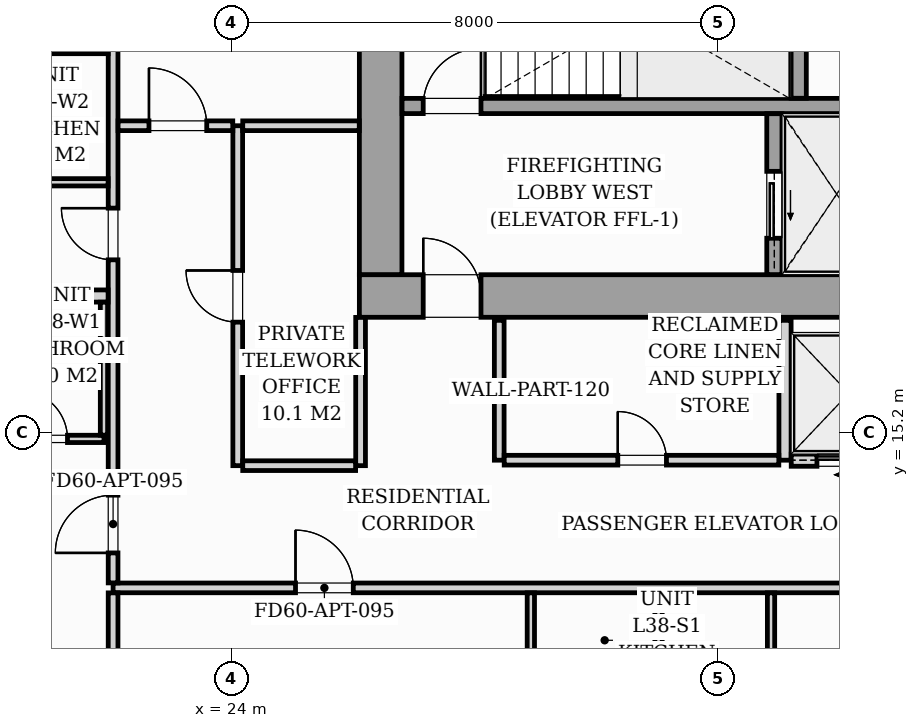
"""IFC4 building model, lengths in metres.
Left out: names, types, materials, properties, quantities, classifications, styles, units other than length and angle.
Written with IfcOpenShell. Run it as: python <this file> out.ifc"""

import sys

from ifc_helpers import new_model, si_unit, direction, frame, frame_2d, origin, origin_2d, place, context, subcontext, project, spatial, rectangle, i_section, extrude, source, transform, mapped, element, fill, save


model = new_model("IFC4")
c1 = context("Model", 3, precision=1e-05, world=origin(), true_north=direction((0.0, 1.0)))
c2 = subcontext(c1, "Body", "Model", "MODEL_VIEW")
j1 = project(units=[si_unit("LENGTHUNIT", "METRE"), si_unit("PLANEANGLEUNIT", "RADIAN")], contexts=[c1])
p1 = place(None, origin())
s1 = spatial("IfcSite", under=j1, at=p1, CompositionType="ELEMENT")
p2 = place(p1, origin())
s2 = spatial("IfcBuilding", under=s1, at=p2, CompositionType="ELEMENT")
p3 = place(p2, frame((0.0, 0.0, 134.2)))
s3 = spatial("IfcBuildingStorey", under=s2, at=p3, CompositionType="ELEMENT", Elevation=134.2)
m1 = source(origin(), c2, "Body", "SweptSolid", [
    extrude(i_section(OverallWidth=0.421, OverallDepth=0.465, WebThickness=0.045, FlangeThickness=0.073, FilletRadius=0.018, at=origin_2d()), origin(), (0.0, 0.0, 1.0), 3.196),
])
for number, where, z_axis, x_axis in (
    (1, (26.4, 17.4, 0.002), (0.0, 0.0, 1.0), (1.0, 0.0, 0.0)),
    (2, (33.12, 17.4, 0.002), (0.0, 0.0, 1.0), (1.0, 0.0, 0.0)),
):
    element("IfcColumn", number, at=place(p3, frame(where, z_axis=z_axis, x_axis=x_axis)), inside=s3, PredefinedType="PILASTER", context=c2, shape_type="MappedRepresentation", body=[
        mapped(m1, transform((0.0, 0.0, 0.0), scale=1.0)),
    ])
p4 = place(p3, frame((26.1, 17.45, 0.0), z_axis=(0.0, 0.0, 1.0), x_axis=(1.0, 0.0, 0.0)))
e3 = element("IfcWall", 3, at=p4, inside=s3, PredefinedType="SHEAR", context=c2, shape_type="SweptSolid", body=[
    extrude(rectangle(XDim=19.8, YDim=0.7, at=frame_2d((9.9, 0.0))), origin(), (0.0, 0.0, 1.0), 3.2),
])
p5 = place(p4, frame((1.05, 0.0, 0.0)))
e4 = element("IfcOpeningElement", 4, at=p5, cuts=e3, PredefinedType="OPENING", context=c2, shape_type="SweptSolid", body=[
    extrude(rectangle(XDim=0.95, YDim=2.06, at=frame_2d((0.475, 1.03))), frame((0.0, 0.36, 0.0), z_axis=(0.0, -1.0, 0.0), x_axis=(1.0, 0.0, 0.0)), (0.0, 0.0, 1.0), 0.72),
])
p6 = place(p4, frame((9.48, 0.0, 0.0)))
e5 = element("IfcOpeningElement", 5, at=p6, cuts=e3, PredefinedType="OPENING", context=c2, shape_type="SweptSolid", body=[
    extrude(rectangle(XDim=0.85, YDim=2.0, at=frame_2d((0.425, 1.0))), frame((0.0, 0.36, 0.0), z_axis=(0.0, -1.0, 0.0), x_axis=(1.0, 0.0, 0.0)), (0.0, 0.0, 1.0), 0.72),
])
p7 = place(p4, frame((17.65, 0.0, 0.0)))
e6 = element("IfcOpeningElement", 6, at=p7, cuts=e3, PredefinedType="OPENING", context=c2, shape_type="SweptSolid", body=[
    extrude(rectangle(XDim=0.95, YDim=2.06, at=frame_2d((0.475, 1.03))), frame((0.0, 0.36, 0.0), z_axis=(0.0, -1.0, 0.0), x_axis=(1.0, 0.0, 0.0)), (0.0, 0.0, 1.0), 0.72),
])
p8 = place(p3, frame((26.45, 17.802, 0.0), z_axis=(0.0, 0.0, 1.0), x_axis=(0.0, 1.0, 0.0)))
e7 = element("IfcWall", 7, at=p8, inside=s3, PredefinedType="SHEAR", context=c2, shape_type="SweptSolid", body=[
    extrude(rectangle(XDim=5.796, YDim=0.7, at=frame_2d((2.898, 0.0))), origin(), (0.0, 0.0, 1.0), 3.2),
])
p9 = place(p3, frame((26.802, 20.575, 0.0), z_axis=(0.0, 0.0, 1.0), x_axis=(1.0, 0.0, 0.0)))
e8 = element("IfcWall", 8, at=p9, inside=s3, PredefinedType="SOLIDWALL", context=c2, shape_type="SweptSolid", body=[
    extrude(rectangle(XDim=8.148, YDim=0.25, at=frame_2d((4.074, 0.0))), origin(), (0.0, 0.0, 1.0), 3.2),
])
p10 = place(p9, frame((0.348, 0.0, 0.0)))
e9 = element("IfcOpeningElement", 9, at=p10, cuts=e8, PredefinedType="OPENING", context=c2, shape_type="SweptSolid", body=[
    extrude(rectangle(XDim=0.95, YDim=2.06, at=frame_2d((0.475, 1.03))), frame((0.0, 0.135, 0.0), z_axis=(0.0, -1.0, 0.0), x_axis=(1.0, 0.0, 0.0)), (0.0, 0.0, 1.0), 0.27),
])
p11 = place(p3, frame((33.325, 20.702, 0.0), z_axis=(0.0, 0.0, 1.0), x_axis=(0.0, 1.0, 0.0)))
e10 = element("IfcWall", 10, at=p11, inside=s3, PredefinedType="SOLIDWALL", context=c2, shape_type="SweptSolid", body=[
    extrude(rectangle(XDim=2.896, YDim=0.25, at=frame_2d((1.448, 0.0))), origin(), (0.0, 0.0, 1.0), 3.2),
])
p12 = place(p3, frame((32.925, 17.802, 0.0), z_axis=(0.0, 0.0, 1.0), x_axis=(0.0, 1.0, 0.0)))
e11 = element("IfcWall", 11, at=p12, inside=s3, PredefinedType="SOLIDWALL", context=c2, shape_type="SweptSolid", body=[
    extrude(rectangle(XDim=2.646, YDim=0.25, at=frame_2d((1.323, 0.0))), origin(), (0.0, 0.0, 1.0), 3.2),
])
p13 = place(p12, frame((0.598, 0.0, 0.0)))
e12 = element("IfcOpeningElement", 12, at=p13, cuts=e11, PredefinedType="OPENING", context=c2, shape_type="SweptSolid", body=[
    extrude(rectangle(XDim=1.1, YDim=2.08, at=frame_2d((0.55, 1.04))), frame((0.0, 0.135, 0.0), z_axis=(0.0, -1.0, 0.0), x_axis=(1.0, 0.0, 0.0)), (0.0, 0.0, 1.0), 0.27),
])
p14 = place(p3, frame((28.4, 14.75, 0.0), z_axis=(0.0, 0.0, 1.0), x_axis=(0.0, 1.0, 0.0)))
e13 = element("IfcWall", 13, at=p14, inside=s3, PredefinedType="PARTITIONING", context=c2, shape_type="SweptSolid", body=[
    extrude(rectangle(XDim=2.3, YDim=0.16, at=frame_2d((1.15, 0.0))), origin(), (0.0, 0.0, 1.0), 2.94),
])
p15 = place(p3, frame((33.1, 14.75, 0.0), z_axis=(0.0, 0.0, 1.0), x_axis=(0.0, 1.0, 0.0)))
e14 = element("IfcWall", 14, at=p15, inside=s3, PredefinedType="PARTITIONING", context=c2, shape_type="SweptSolid", body=[
    extrude(rectangle(XDim=2.3, YDim=0.2, at=frame_2d((1.15, 0.0))), origin(), (0.0, 0.0, 1.0), 2.94),
])
p16 = place(p3, frame((28.482, 14.75, 0.0), z_axis=(0.0, 0.0, 1.0), x_axis=(1.0, 0.0, 0.0)))
e15 = element("IfcWall", 15, at=p16, inside=s3, PredefinedType="PARTITIONING", context=c2, shape_type="SweptSolid", body=[
    extrude(rectangle(XDim=4.516, YDim=0.16, at=frame_2d((2.258, 0.0))), origin(), (0.0, 0.0, 1.0), 2.94),
])
p17 = place(p16, frame((1.868, 0.0, 0.0)))
e16 = element("IfcOpeningElement", 16, at=p17, cuts=e15, PredefinedType="OPENING", context=c2, shape_type="SweptSolid", body=[
    extrude(rectangle(XDim=0.8, YDim=2.05, at=frame_2d((0.4, 1.025))), frame((0.0, 0.09, 0.0), z_axis=(0.0, -1.0, 0.0), x_axis=(1.0, 0.0, 0.0)), (0.0, 0.0, 1.0), 0.18),
])
p18 = place(p3, frame((33.202, 14.75, 0.0), z_axis=(0.0, 0.0, 1.0), x_axis=(1.0, 0.0, 0.0)))
e17 = element("IfcWall", 17, at=p18, inside=s3, PredefinedType="PARTITIONING", context=c2, shape_type="SweptSolid", body=[
    extrude(rectangle(XDim=1.896, YDim=0.2, at=frame_2d((0.948, 0.0))), origin(), (0.0, 0.0, 1.0), 2.94),
])
p19 = place(p18, frame((0.423, 0.0, 0.0)))
e18 = element("IfcOpeningElement", 18, at=p19, cuts=e17, PredefinedType="OPENING", context=c2, shape_type="SweptSolid", body=[
    extrude(rectangle(XDim=1.05, YDim=2.08, at=frame_2d((0.525, 1.04))), frame((0.0, 0.11, 0.0), z_axis=(0.0, -1.0, 0.0), x_axis=(1.0, 0.0, 0.0)), (0.0, 0.0, 1.0), 0.22),
])
p20 = place(p3, frame((22.05, 12.65, 0.0), z_axis=(0.0, 0.0, 1.0), x_axis=(1.0, 0.0, 0.0)))
e19 = element("IfcWall", 19, at=p20, inside=s3, PredefinedType="PARTITIONING", context=c2, shape_type="SweptSolid", body=[
    extrude(rectangle(XDim=23.83, YDim=0.16, at=frame_2d((11.915, 0.0))), origin(), (0.0, 0.0, 1.0), 2.94),
])
p21 = place(p20, frame((3.0, 0.0, 0.0)))
e20 = element("IfcOpeningElement", 20, at=p21, cuts=e19, PredefinedType="OPENING", context=c2, shape_type="SweptSolid", body=[
    extrude(rectangle(XDim=0.95, YDim=2.06, at=frame_2d((0.475, 1.03))), frame((0.0, 0.09, 0.0), z_axis=(0.0, -1.0, 0.0), x_axis=(1.0, 0.0, 0.0)), (0.0, 0.0, 1.0), 0.18),
])
p22 = place(p20, frame((15.485, 0.0, 0.0)))
e21 = element("IfcOpeningElement", 21, at=p22, cuts=e19, PredefinedType="OPENING", context=c2, shape_type="SweptSolid", body=[
    extrude(rectangle(XDim=0.95, YDim=2.06, at=frame_2d((0.475, 1.03))), frame((0.0, 0.09, 0.0), z_axis=(0.0, -1.0, 0.0), x_axis=(1.0, 0.0, 0.0)), (0.0, 0.0, 1.0), 0.18),
])
p23 = place(p3, frame((22.05, 8.253, 0.0), z_axis=(0.0, 0.0, 1.0), x_axis=(0.0, 1.0, 0.0)))
e22 = element("IfcWall", 22, at=p23, inside=s3, PredefinedType="PARTITIONING", context=c2, shape_type="SweptSolid", body=[
    extrude(rectangle(XDim=4.315, YDim=0.16, at=frame_2d((2.157, 0.0))), origin(), (0.0, 0.0, 1.0), 2.94),
])
p24 = place(p3, frame((22.05, 12.732, 0.0), z_axis=(0.0, 0.0, 1.0), x_axis=(0.0, 1.0, 0.0)))
e23 = element("IfcWall", 23, at=p24, inside=s3, PredefinedType="PARTITIONING", context=c2, shape_type="SweptSolid", body=[
    extrude(rectangle(XDim=14.685, YDim=0.16, at=frame_2d((7.343, 0.0))), origin(), (0.0, 0.0, 1.0), 2.94),
])
p25 = place(p24, frame((0.493, 0.0, 0.0)))
e24 = element("IfcOpeningElement", 24, at=p25, cuts=e23, PredefinedType="OPENING", context=c2, shape_type="SweptSolid", body=[
    extrude(rectangle(XDim=0.95, YDim=2.06, at=frame_2d((0.475, 1.03))), frame((0.0, 0.09, 0.0), z_axis=(0.0, -1.0, 0.0), x_axis=(1.0, 0.0, 0.0)), (0.0, 0.0, 1.0), 0.18),
])
p26 = place(p24, frame((5.313, 0.0, 0.0)))
e25 = element("IfcOpeningElement", 25, at=p26, cuts=e23, PredefinedType="OPENING", context=c2, shape_type="SweptSolid", body=[
    extrude(rectangle(XDim=0.85, YDim=2.0, at=frame_2d((0.425, 1.0))), frame((0.0, 0.09, 0.0), z_axis=(0.0, -1.0, 0.0), x_axis=(1.0, 0.0, 0.0)), (0.0, 0.0, 1.0), 0.18),
])
p27 = place(p3, frame((32.87, 7.028, 0.0), z_axis=(0.0, 0.0, 1.0), x_axis=(0.0, 1.0, 0.0)))
e26 = element("IfcWall", 26, at=p27, inside=s3, PredefinedType="PARTITIONING", context=c2, shape_type="SweptSolid", body=[
    extrude(rectangle(XDim=5.54, YDim=0.12, at=frame_2d((2.77, 0.0))), origin(), (0.0, 0.0, 1.0), 2.94),
])
p28 = place(p27, frame((2.272, 0.0, 0.0)))
e27 = element("IfcOpeningElement", 27, at=p28, cuts=e26, PredefinedType="OPENING", context=c2, shape_type="SweptSolid", body=[
    extrude(rectangle(XDim=0.9, YDim=2.05, at=frame_2d((0.45, 1.025))), frame((0.0, 0.07, 0.0), z_axis=(0.0, -1.0, 0.0), x_axis=(1.0, 0.0, 0.0)), (0.0, 0.0, 1.0), 0.14),
])
for number, where, z_axis, x_axis in (
    (28, (31.02, 10.462, 0.0), (0.0, 0.0, 1.0), (0.0, 1.0, 0.0)),
    (29, (28.92, 10.462, 0.0), (0.0, 0.0, 1.0), (0.0, 1.0, 0.0)),
):
    element("IfcWall", number, at=place(p3, frame(where, z_axis=z_axis, x_axis=x_axis)), inside=s3, PredefinedType="PARTITIONING", context=c2, shape_type="SweptSolid", body=[
        extrude(rectangle(XDim=2.106, YDim=0.12, at=frame_2d((1.053, 0.0))), origin(), (0.0, 0.0, 1.0), 2.94),
    ])
p29 = place(p3, frame((6.019, 17.45, 0.0), z_axis=(0.0, 0.0, 1.0), x_axis=(1.0, 0.0, 0.0)))
e30 = element("IfcWall", 30, at=p29, inside=s3, PredefinedType="PARTITIONING", context=c2, shape_type="SweptSolid", body=[
    extrude(rectangle(XDim=15.949, YDim=0.2, at=frame_2d((7.975, 0.0))), origin(), (0.0, 0.0, 1.0), 2.94),
])
p30 = place(p3, frame((17.7, 15.1, 0.0), z_axis=(0.0, 0.0, 1.0), x_axis=(1.0, 0.0, 0.0)))
e31 = element("IfcWall", 31, at=p30, inside=s3, PredefinedType="PARTITIONING", context=c2, shape_type="SweptSolid", body=[
    extrude(rectangle(XDim=4.2, YDim=0.12, at=frame_2d((2.1, 0.0))), origin(), (0.0, 0.0, 1.0), 2.94),
])
p31 = place(p30, frame((0.675, 0.0, 0.0)))
e32 = element("IfcOpeningElement", 32, at=p31, cuts=e31, PredefinedType="OPENING", context=c2, shape_type="SweptSolid", body=[
    extrude(rectangle(XDim=0.85, YDim=2.05, at=frame_2d((0.425, 1.025))), frame((0.0, 0.07, 0.0), z_axis=(0.0, -1.0, 0.0), x_axis=(1.0, 0.0, 0.0)), (0.0, 0.0, 1.0), 0.14),
])
p32 = place(p30, frame((2.8, 0.0, 0.0)))
e33 = element("IfcOpeningElement", 33, at=p32, cuts=e31, PredefinedType="OPENING", context=c2, shape_type="SweptSolid", body=[
    extrude(rectangle(XDim=0.8, YDim=2.02, at=frame_2d((0.4, 1.01))), frame((0.0, 0.07, 0.0), z_axis=(0.0, -1.0, 0.0), x_axis=(1.0, 0.0, 0.0)), (0.0, 0.0, 1.0), 0.14),
])
p33 = place(p3, frame((21.9, 15.162, 0.0), z_axis=(0.0, 0.0, 1.0), x_axis=(0.0, 1.0, 0.0)))
e34 = element("IfcWall", 34, at=p33, inside=s3, PredefinedType="PARTITIONING", context=c2, shape_type="SweptSolid", body=[
    extrude(rectangle(XDim=2.186, YDim=0.12, at=frame_2d((1.093, 0.0))), origin(), (0.0, 0.0, 1.0), 2.94),
])
for number, where, z_axis, x_axis in (
    (35, (19.712, 21.495, 0.0), (0.0, 0.0, 1.0), (1.0, 0.0, 0.0)),
    (36, (19.712, 19.32, 0.0), (0.0, 0.0, 1.0), (1.0, 0.0, 0.0)),
):
    element("IfcWall", number, at=place(p3, frame(where, z_axis=z_axis, x_axis=x_axis)), inside=s3, PredefinedType="PARTITIONING", context=c2, shape_type="SweptSolid", body=[
        extrude(rectangle(XDim=2.256, YDim=0.12, at=frame_2d((1.128, 0.0))), origin(), (0.0, 0.0, 1.0), 2.94),
    ])
p34 = place(p3, frame((24.1, 14.66, 0.0), z_axis=(0.0, 0.0, 1.0), x_axis=(0.0, 1.0, 0.0)))
e37 = element("IfcWall", 37, at=p34, inside=s3, PredefinedType="PARTITIONING", context=c2, shape_type="SweptSolid", body=[
    extrude(rectangle(XDim=5.59, YDim=0.16, at=frame_2d((2.795, 0.0))), origin(), (0.0, 0.0, 1.0), 2.94),
])
p35 = place(p34, frame((2.36, 0.0, 0.0)))
e38 = element("IfcOpeningElement", 38, at=p35, cuts=e37, PredefinedType="OPENING", context=c2, shape_type="SweptSolid", body=[
    extrude(rectangle(XDim=0.85, YDim=2.0, at=frame_2d((0.425, 1.0))), frame((0.0, 0.09, 0.0), z_axis=(0.0, -1.0, 0.0), x_axis=(1.0, 0.0, 0.0)), (0.0, 0.0, 1.0), 0.18),
])
p36 = place(p3, frame((22.132, 20.25, 0.0), z_axis=(0.0, 0.0, 1.0), x_axis=(1.0, 0.0, 0.0)))
e39 = element("IfcWall", 39, at=p36, inside=s3, PredefinedType="PARTITIONING", context=c2, shape_type="SweptSolid", body=[
    extrude(rectangle(XDim=1.886, YDim=0.16, at=frame_2d((0.943, 0.0))), origin(), (0.0, 0.0, 1.0), 2.94),
])
p37 = place(p36, frame((0.508, 0.0, 0.0)))
e40 = element("IfcOpeningElement", 40, at=p37, cuts=e39, PredefinedType="OPENING", context=c2, shape_type="SweptSolid", body=[
    extrude(rectangle(XDim=0.95, YDim=2.06, at=frame_2d((0.475, 1.03))), frame((0.0, 0.09, 0.0), z_axis=(0.0, -1.0, 0.0), x_axis=(1.0, 0.0, 0.0)), (0.0, 0.0, 1.0), 0.18),
])
p38 = place(p3, frame((24.182, 20.25, 0.0), z_axis=(0.0, 0.0, 1.0), x_axis=(1.0, 0.0, 0.0)))
e41 = element("IfcWall", 41, at=p38, inside=s3, PredefinedType="PARTITIONING", context=c2, shape_type="SweptSolid", body=[
    extrude(rectangle(XDim=1.916, YDim=0.16, at=frame_2d((0.958, 0.0))), origin(), (0.0, 0.0, 1.0), 2.94),
])
p39 = place(p3, frame((26.12, 14.66, 0.0), z_axis=(0.0, 0.0, 1.0), x_axis=(0.0, 1.0, 0.0)))
e42 = element("IfcWall", 42, at=p39, inside=s3, PredefinedType="PARTITIONING", context=c2, shape_type="SweptSolid", body=[
    extrude(rectangle(XDim=2.438, YDim=0.16, at=frame_2d((1.219, 0.0))), origin(), (0.0, 0.0, 1.0), 2.94),
])
p40 = place(p3, frame((24.182, 14.66, 0.0), z_axis=(0.0, 0.0, 1.0), x_axis=(1.0, 0.0, 0.0)))
e43 = element("IfcWall", 43, at=p40, inside=s3, PredefinedType="PARTITIONING", context=c2, shape_type="SweptSolid", body=[
    extrude(rectangle(XDim=1.856, YDim=0.16, at=frame_2d((0.928, 0.0))), origin(), (0.0, 0.0, 1.0), 2.94),
])
m2 = source(origin(), c2, "Body", "SweptSolid", [
    extrude(rectangle(XDim=0.95, YDim=2.06, at=frame_2d((0.475, 1.03))), frame((0.0, 0.025, 0.0), z_axis=(0.0, -1.0, 0.0), x_axis=(1.0, 0.0, 0.0)), (0.0, 0.0, 1.0), 0.05),
])
p41 = place(p5, origin())
e44 = element("IfcDoor", 44, at=p41, inside=s3, OperationType="SINGLE_SWING_LEFT", PredefinedType="DOOR", context=c2, shape_type="MappedRepresentation", body=[
    mapped(m2, transform((0.0, 0.0, 0.0), scale=1.0)),
])
fill(e4, e44)
p42 = place(p10, origin())
e45 = element("IfcDoor", 45, at=p42, inside=s3, OperationType="SINGLE_SWING_RIGHT", PredefinedType="DOOR", context=c2, shape_type="MappedRepresentation", body=[
    mapped(m2, transform((0.0, 0.0, 0.0), scale=1.0)),
])
fill(e9, e45)
m3 = source(origin(), c2, "Body", "SweptSolid", [
    extrude(rectangle(XDim=1.1, YDim=2.08, at=frame_2d((0.55, 1.04))), frame((0.0, 0.025, 0.0), z_axis=(0.0, -1.0, 0.0), x_axis=(1.0, 0.0, 0.0)), (0.0, 0.0, 1.0), 0.05),
])
p43 = place(p13, origin())
e46 = element("IfcDoor", 46, at=p43, inside=s3, OperationType="SLIDING_TO_LEFT", PredefinedType="DOOR", context=c2, shape_type="MappedRepresentation", body=[
    mapped(m3, transform((0.0, 0.0, 0.0), scale=1.0)),
])
fill(e12, e46)
m4 = source(origin(), c2, "Body", "SweptSolid", [
    extrude(rectangle(XDim=0.8, YDim=2.05, at=frame_2d((0.4, 1.025))), frame((0.0, 0.025, 0.0), z_axis=(0.0, -1.0, 0.0), x_axis=(1.0, 0.0, 0.0)), (0.0, 0.0, 1.0), 0.05),
])
p44 = place(p17, origin())
e47 = element("IfcDoor", 47, at=p44, inside=s3, OperationType="SINGLE_SWING_LEFT", PredefinedType="DOOR", context=c2, shape_type="MappedRepresentation", body=[
    mapped(m4, transform((0.0, 0.0, 0.0), scale=1.0)),
])
fill(e16, e47)
m5 = source(origin(), c2, "Body", "SweptSolid", [
    extrude(rectangle(XDim=1.05, YDim=2.08, at=frame_2d((0.525, 1.04))), frame((0.0, 0.025, 0.0), z_axis=(0.0, -1.0, 0.0), x_axis=(1.0, 0.0, 0.0)), (0.0, 0.0, 1.0), 0.05),
])
p45 = place(p19, origin())
e48 = element("IfcDoor", 48, at=p45, inside=s3, OperationType="SLIDING_TO_LEFT", PredefinedType="DOOR", context=c2, shape_type="MappedRepresentation", body=[
    mapped(m5, transform((0.0, 0.0, 0.0), scale=1.0)),
])
fill(e18, e48)
m6 = source(origin(), c2, "Body", "SweptSolid", [
    extrude(rectangle(XDim=0.95, YDim=2.06, at=frame_2d((0.475, 1.03))), frame((0.0, 0.025, 0.0), z_axis=(0.0, -1.0, 0.0), x_axis=(1.0, 0.0, 0.0)), (0.0, 0.0, 1.0), 0.05),
])
p46 = place(p21, origin())
e49 = element("IfcDoor", 49, at=p46, inside=s3, OperationType="SINGLE_SWING_LEFT", PredefinedType="DOOR", context=c2, shape_type="MappedRepresentation", body=[
    mapped(m6, transform((0.0, 0.0, 0.0), scale=1.0)),
])
fill(e20, e49)
p47 = place(p25, origin())
e50 = element("IfcDoor", 50, at=p47, inside=s3, OperationType="SINGLE_SWING_LEFT", PredefinedType="DOOR", context=c2, shape_type="MappedRepresentation", body=[
    mapped(m6, transform((0.0, 0.0, 0.0), scale=1.0)),
])
fill(e24, e50)
m7 = source(origin(), c2, "Body", "SweptSolid", [
    extrude(rectangle(XDim=0.8, YDim=2.02, at=frame_2d((0.4, 1.01))), frame((0.0, 0.025, 0.0), z_axis=(0.0, -1.0, 0.0), x_axis=(1.0, 0.0, 0.0)), (0.0, 0.0, 1.0), 0.05),
])
p48 = place(p32, origin())
e51 = element("IfcDoor", 51, at=p48, inside=s3, OperationType="SINGLE_SWING_LEFT", PredefinedType="DOOR", context=c2, shape_type="MappedRepresentation", body=[
    mapped(m7, transform((0.0, 0.0, 0.0), scale=1.0)),
])
fill(e33, e51)
m8 = source(origin(), c2, "Body", "SweptSolid", [
    extrude(rectangle(XDim=0.85, YDim=2.0, at=frame_2d((0.425, 1.0))), frame((0.0, 0.025, 0.0), z_axis=(0.0, -1.0, 0.0), x_axis=(1.0, 0.0, 0.0)), (0.0, 0.0, 1.0), 0.05),
])
p49 = place(p26, origin())
e52 = element("IfcDoor", 52, at=p49, inside=s3, OperationType="SINGLE_SWING_RIGHT", PredefinedType="DOOR", context=c2, shape_type="MappedRepresentation", body=[
    mapped(m8, transform((0.0, 0.0, 0.0), scale=1.0)),
])
fill(e25, e52)
p50 = place(p35, origin())
e53 = element("IfcDoor", 53, at=p50, inside=s3, OperationType="SINGLE_SWING_RIGHT", PredefinedType="DOOR", context=c2, shape_type="MappedRepresentation", body=[
    mapped(m8, transform((0.0, 0.0, 0.0), scale=1.0)),
])
fill(e38, e53)
p51 = place(p37, origin())
e54 = element("IfcDoor", 54, at=p51, inside=s3, OperationType="SINGLE_SWING_LEFT", PredefinedType="DOOR", context=c2, shape_type="MappedRepresentation", body=[
    mapped(m6, transform((0.0, 0.0, 0.0), scale=1.0)),
])
fill(e40, e54)
save(model, sys.argv[1])
